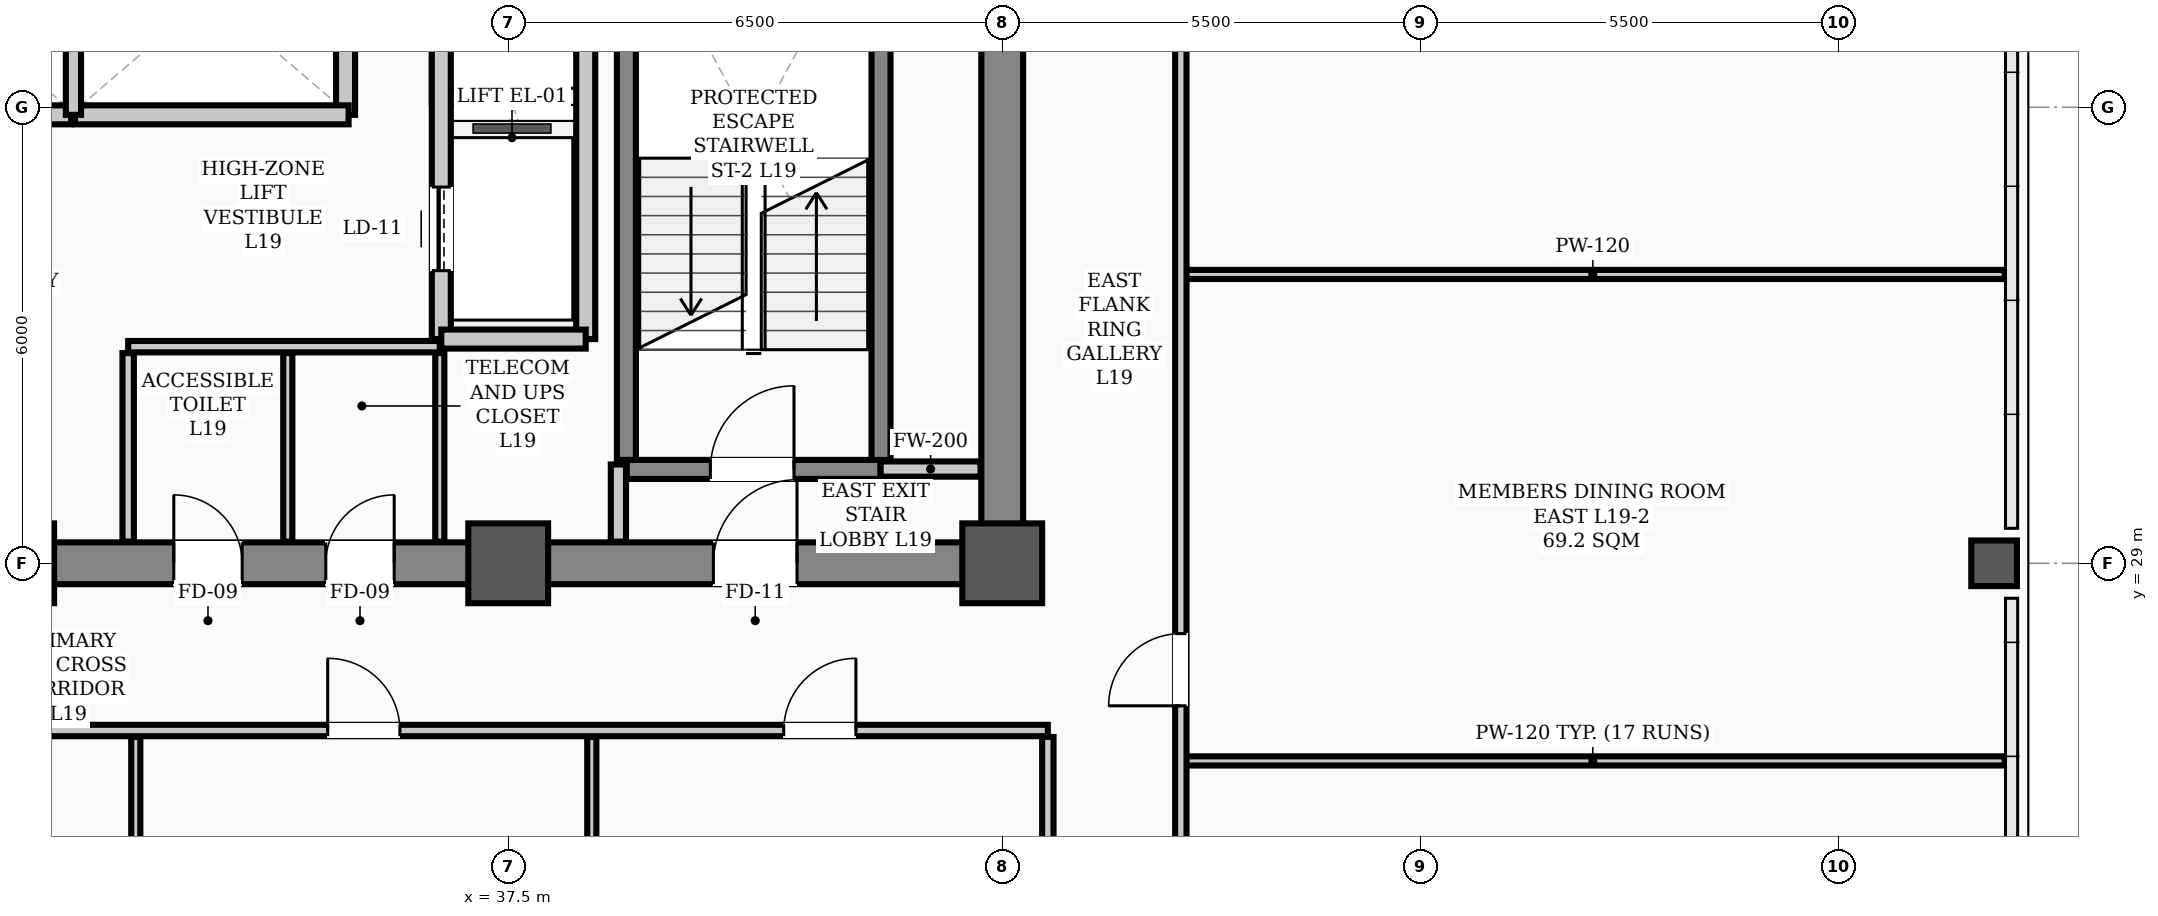
"""IFC4 building model, lengths in metres.
Left out: names, types, materials, properties, quantities, classifications, styles, units other than length and angle.
Written with IfcOpenShell. Run it as: python <this file> out.ifc"""

import sys

from ifc_helpers import new_model, si_unit, direction, frame, frame_2d, origin, origin_2d, place, context, subcontext, project, spatial, rectangle, hollow_rectangle, extrude, element, fill, save


model = new_model("IFC4")
c1 = context("Model", 3, precision=1e-05, world=origin(), true_north=direction((0.0, 1.0)))
c2 = subcontext(c1, "Body", "Model", "MODEL_VIEW")
j1 = project(units=[si_unit("LENGTHUNIT", "METRE"), si_unit("PLANEANGLEUNIT", "RADIAN")], contexts=[c1])
p1 = place(None, origin())
s1 = spatial("IfcSite", under=j1, at=p1, CompositionType="ELEMENT")
p2 = place(p1, origin())
s2 = spatial("IfcBuilding", under=s1, at=p2, CompositionType="ELEMENT")
p3 = place(p2, frame((0.0, 0.0, 77.2)))
s3 = spatial("IfcBuildingStorey", under=s2, at=p3, CompositionType="ELEMENT", Elevation=77.2)
for number, where, z_axis, x_axis in (
    (1, (31.0, 29.0, 0.0), (0.0, 0.0, 1.0), (1.0, 0.0, 0.0)),
    (2, (37.5, 29.0, 0.0), (0.0, 0.0, 1.0), (1.0, 0.0, 0.0)),
    (3, (44.0, 29.0, 0.0), (0.0, 0.0, 1.0), (1.0, 0.0, 0.0)),
):
    element("IfcColumn", number, at=place(p3, frame(where, z_axis=z_axis, x_axis=x_axis)), inside=s3, PredefinedType="COLUMN", context=c2, shape_type="SweptSolid", body=[
        extrude(hollow_rectangle(XDim=1.05, YDim=1.05, WallThickness=0.038, InnerFilletRadius=0.019, OuterFilletRadius=0.057, at=origin_2d()), origin(), (0.0, 0.0, 1.0), 3.9),
    ])
p4 = place(p3, frame((57.05, 29.0, 0.0), z_axis=(0.0, 0.0, 1.0), x_axis=(1.0, 0.0, 0.0)))
e4 = element("IfcColumn", 4, at=p4, inside=s3, PredefinedType="COLUMN", context=c2, shape_type="SweptSolid", body=[
    extrude(hollow_rectangle(XDim=0.6, YDim=0.6, WallThickness=0.026, InnerFilletRadius=0.013, OuterFilletRadius=0.039, at=origin_2d()), origin(), (0.0, 0.0, 1.0), 3.9),
])
p5 = place(p3, frame((13.5, 29.0, 0.0), z_axis=(0.0, 0.0, 1.0), x_axis=(1.0, 0.0, 0.0)))
e5 = element("IfcWall", 5, at=p5, inside=s3, PredefinedType="SHEAR", context=c2, shape_type="SweptSolid", body=[
    extrude(rectangle(XDim=30.5, YDim=0.55, at=frame_2d((15.25, 0.0))), origin(), (0.0, 0.0, 1.0), 3.66),
])
p6 = place(p5, frame((1.75, 0.0, 0.0)))
e6 = element("IfcOpeningElement", 6, at=p6, cuts=e5, PredefinedType="OPENING", context=c2, shape_type="SweptSolid", body=[
    extrude(rectangle(XDim=1.1, YDim=2.08, at=frame_2d((0.55, 1.04))), frame((0.0, 0.285, 0.0), z_axis=(0.0, -1.0, 0.0), x_axis=(1.0, 0.0, 0.0)), (0.0, 0.0, 1.0), 0.57),
])
p7 = place(p5, frame((26.7, 0.0, 0.0)))
e7 = element("IfcOpeningElement", 7, at=p7, cuts=e5, PredefinedType="OPENING", context=c2, shape_type="SweptSolid", body=[
    extrude(rectangle(XDim=1.1, YDim=2.08, at=frame_2d((0.55, 1.04))), frame((0.0, 0.285, 0.0), z_axis=(0.0, -1.0, 0.0), x_axis=(1.0, 0.0, 0.0)), (0.0, 0.0, 1.0), 0.57),
])
p8 = place(p5, frame((6.8, 0.0, 0.0)))
e8 = element("IfcOpeningElement", 8, at=p8, cuts=e5, PredefinedType="OPENING", context=c2, shape_type="SweptSolid", body=[
    extrude(rectangle(XDim=1.1, YDim=2.08, at=frame_2d((0.55, 1.04))), frame((0.0, 0.285, 0.0), z_axis=(0.0, -1.0, 0.0), x_axis=(1.0, 0.0, 0.0)), (0.0, 0.0, 1.0), 0.57),
])
p9 = place(p5, frame((13.2, 0.0, 0.0)))
e9 = element("IfcOpeningElement", 9, at=p9, cuts=e5, PredefinedType="OPENING", context=c2, shape_type="SweptSolid", body=[
    extrude(rectangle(XDim=1.6, YDim=2.08, at=frame_2d((0.8, 1.04))), frame((0.0, 0.285, 0.0), z_axis=(0.0, -1.0, 0.0), x_axis=(1.0, 0.0, 0.0)), (0.0, 0.0, 1.0), 0.57),
])
p10 = place(p5, frame((19.6, 0.0, 0.0)))
e10 = element("IfcOpeningElement", 10, at=p10, cuts=e5, PredefinedType="OPENING", context=c2, shape_type="SweptSolid", body=[
    extrude(rectangle(XDim=0.9, YDim=2.08, at=frame_2d((0.45, 1.04))), frame((0.0, 0.285, 0.0), z_axis=(0.0, -1.0, 0.0), x_axis=(1.0, 0.0, 0.0)), (0.0, 0.0, 1.0), 0.57),
])
p11 = place(p5, frame((21.6, 0.0, 0.0)))
e11 = element("IfcOpeningElement", 11, at=p11, cuts=e5, PredefinedType="OPENING", context=c2, shape_type="SweptSolid", body=[
    extrude(rectangle(XDim=0.9, YDim=2.08, at=frame_2d((0.45, 1.04))), frame((0.0, 0.285, 0.0), z_axis=(0.0, -1.0, 0.0), x_axis=(1.0, 0.0, 0.0)), (0.0, 0.0, 1.0), 0.57),
])
p12 = place(p3, frame((44.0, 29.35, 0.0), z_axis=(0.0, 0.0, 1.0), x_axis=(0.0, 1.0, 0.0)))
e12 = element("IfcWall", 12, at=p12, inside=s3, PredefinedType="SHEAR", context=c2, shape_type="SweptSolid", body=[
    extrude(rectangle(XDim=8.6, YDim=0.55, at=frame_2d((4.3, 0.0))), origin(), (0.0, 0.0, 1.0), 3.66),
])
p13 = place(p3, frame((39.06, 30.235, 0.0), z_axis=(0.0, 0.0, 1.0), x_axis=(1.0, 0.0, 0.0)))
e13 = element("IfcWall", 13, at=p13, inside=s3, PredefinedType="STANDARD", context=c2, shape_type="SweptSolid", body=[
    extrude(rectangle(XDim=3.34, YDim=0.25, at=frame_2d((1.67, 0.0))), origin(), (0.0, 0.0, 1.0), 3.66),
])
p14 = place(p13, frame((1.1, 0.0, 0.0)))
e14 = element("IfcOpeningElement", 14, at=p14, cuts=e13, PredefinedType="OPENING", context=c2, shape_type="SweptSolid", body=[
    extrude(rectangle(XDim=1.1, YDim=2.08, at=frame_2d((0.55, 1.04))), frame((0.0, 0.135, 0.0), z_axis=(0.0, -1.0, 0.0), x_axis=(1.0, 0.0, 0.0)), (0.0, 0.0, 1.0), 0.27),
])
for number, where, z_axis, x_axis in (
    (15, (39.055, 30.36, 0.0), (0.0, 0.0, 1.0), (0.0, 1.0, 0.0)),
    (16, (42.405, 30.36, 0.0), (0.0, 0.0, 1.0), (0.0, 1.0, 0.0)),
):
    element("IfcWall", number, at=place(p3, frame(where, z_axis=z_axis, x_axis=x_axis)), inside=s3, PredefinedType="STANDARD", context=c2, shape_type="SweptSolid", body=[
        extrude(rectangle(XDim=7.184, YDim=0.25, at=frame_2d((3.592, 0.0))), origin(), (0.0, 0.0, 1.0), 3.66),
    ])
p15 = place(p3, frame((36.62, 31.95, 0.0), z_axis=(0.0, 0.0, 1.0), x_axis=(0.0, 1.0, 0.0)))
e17 = element("IfcWall", 17, at=p15, inside=s3, PredefinedType="STANDARD", context=c2, shape_type="SweptSolid", body=[
    extrude(rectangle(XDim=6.0, YDim=0.25, at=frame_2d((3.0, 0.0))), origin(), (0.0, 0.0, 1.0), 2.24),
])
p16 = place(p15, frame((0.9, 0.0, 0.0)))
e18 = element("IfcOpeningElement", 18, at=p16, cuts=e17, PredefinedType="OPENING", context=c2, shape_type="SweptSolid", body=[
    extrude(rectangle(XDim=1.1, YDim=2.08, at=frame_2d((0.55, 1.04))), frame((0.0, 0.135, 0.0), z_axis=(0.0, -1.0, 0.0), x_axis=(1.0, 0.0, 0.0)), (0.0, 0.0, 1.0), 0.27),
])
p17 = place(p15, frame((4.0, 0.0, 0.0)))
e19 = element("IfcOpeningElement", 19, at=p17, cuts=e17, PredefinedType="OPENING", context=c2, shape_type="SweptSolid", body=[
    extrude(rectangle(XDim=1.1, YDim=2.08, at=frame_2d((0.55, 1.04))), frame((0.0, 0.135, 0.0), z_axis=(0.0, -1.0, 0.0), x_axis=(1.0, 0.0, 0.0)), (0.0, 0.0, 1.0), 0.27),
])
p18 = place(p3, frame((38.52, 31.95, 0.0), z_axis=(0.0, 0.0, 1.0), x_axis=(0.0, 1.0, 0.0)))
e20 = element("IfcWall", 20, at=p18, inside=s3, PredefinedType="STANDARD", context=c2, shape_type="SweptSolid", body=[
    extrude(rectangle(XDim=6.0, YDim=0.25, at=frame_2d((3.0, 0.0))), origin(), (0.0, 0.0, 1.0), 2.24),
])
p19 = place(p3, frame((36.62, 31.95, 0.0), z_axis=(0.0, 0.0, 1.0), x_axis=(1.0, 0.0, 0.0)))
e21 = element("IfcWall", 21, at=p19, inside=s3, PredefinedType="STANDARD", context=c2, shape_type="SweptSolid", body=[
    extrude(rectangle(XDim=1.9, YDim=0.25, at=frame_2d((0.95, 0.0))), origin(), (0.0, 0.0, 1.0), 3.48),
])
p20 = place(p3, frame((35.36, 34.9, 0.0), z_axis=(0.0, 0.0, 1.0), x_axis=(0.0, 1.0, 0.0)))
e22 = element("IfcWall", 22, at=p20, inside=s3, PredefinedType="STANDARD", context=c2, shape_type="SweptSolid", body=[
    extrude(rectangle(XDim=3.05, YDim=0.25, at=frame_2d((1.525, 0.0))), origin(), (0.0, 0.0, 1.0), 2.24),
])
p21 = place(p3, frame((28.2, 34.9, 0.0), z_axis=(0.0, 0.0, 1.0), x_axis=(1.0, 0.0, 0.0)))
e23 = element("IfcWall", 23, at=p21, inside=s3, PredefinedType="STANDARD", context=c2, shape_type="SweptSolid", body=[
    extrude(rectangle(XDim=3.55, YDim=0.25, at=frame_2d((1.775, 0.0))), origin(), (0.0, 0.0, 1.0), 3.66),
])
p22 = place(p3, frame((31.8, 34.9, 0.0), z_axis=(0.0, 0.0, 1.0), x_axis=(1.0, 0.0, 0.0)))
e24 = element("IfcWall", 24, at=p22, inside=s3, PredefinedType="STANDARD", context=c2, shape_type="SweptSolid", body=[
    extrude(rectangle(XDim=3.6, YDim=0.25, at=frame_2d((1.8, 0.0))), origin(), (0.0, 0.0, 1.0), 3.66),
])
p23 = place(p3, frame((42.4, 30.24, 0.0), z_axis=(0.0, 0.0, 1.0), x_axis=(1.0, 0.0, 0.0)))
e25 = element("IfcWall", 25, at=p23, inside=s3, PredefinedType="STANDARD", context=c2, shape_type="SweptSolid", body=[
    extrude(rectangle(XDim=1.315, YDim=0.2, at=frame_2d((0.658, 0.0))), origin(), (0.0, 0.0, 1.0), 2.24),
])
p24 = place(p3, frame((32.5, 31.85, 0.0), z_axis=(0.0, 0.0, 1.0), x_axis=(1.0, 0.0, 0.0)))
e26 = element("IfcWall", 26, at=p24, inside=s3, PredefinedType="PARTITIONING", context=c2, shape_type="SweptSolid", body=[
    extrude(rectangle(XDim=4.1, YDim=0.15, at=frame_2d((2.05, 0.0))), origin(), (0.0, 0.0, 1.0), 3.66),
])
p25 = place(p3, frame((12.9, 26.8, 0.0), z_axis=(0.0, 0.0, 1.0), x_axis=(1.0, 0.0, 0.0)))
e27 = element("IfcWall", 27, at=p25, inside=s3, PredefinedType="PARTITIONING", context=c2, shape_type="SweptSolid", body=[
    extrude(rectangle(XDim=31.7, YDim=0.15, at=frame_2d((15.85, 0.0))), origin(), (0.0, 0.0, 1.0), 2.24),
])
p26 = place(p25, frame((13.6, 0.0, 0.0)))
e28 = element("IfcOpeningElement", 28, at=p26, cuts=e27, PredefinedType="OPENING", context=c2, shape_type="SweptSolid", body=[
    extrude(rectangle(XDim=1.6, YDim=2.08, at=frame_2d((0.8, 1.04))), frame((0.0, 0.085, 0.0), z_axis=(0.0, -1.0, 0.0), x_axis=(1.0, 0.0, 0.0)), (0.0, 0.0, 1.0), 0.17),
])
p27 = place(p25, frame((1.875, 0.0, 0.0)))
e29 = element("IfcOpeningElement", 29, at=p27, cuts=e27, PredefinedType="OPENING", context=c2, shape_type="SweptSolid", body=[
    extrude(rectangle(XDim=0.95, YDim=2.08, at=frame_2d((0.475, 1.04))), frame((0.0, 0.085, 0.0), z_axis=(0.0, -1.0, 0.0), x_axis=(1.0, 0.0, 0.0)), (0.0, 0.0, 1.0), 0.17),
])
p28 = place(p25, frame((6.425, 0.0, 0.0)))
e30 = element("IfcOpeningElement", 30, at=p28, cuts=e27, PredefinedType="OPENING", context=c2, shape_type="SweptSolid", body=[
    extrude(rectangle(XDim=0.95, YDim=2.08, at=frame_2d((0.475, 1.04))), frame((0.0, 0.085, 0.0), z_axis=(0.0, -1.0, 0.0), x_axis=(1.0, 0.0, 0.0)), (0.0, 0.0, 1.0), 0.17),
])
p29 = place(p25, frame((10.725, 0.0, 0.0)))
e31 = element("IfcOpeningElement", 31, at=p29, cuts=e27, PredefinedType="OPENING", context=c2, shape_type="SweptSolid", body=[
    extrude(rectangle(XDim=0.95, YDim=2.08, at=frame_2d((0.475, 1.04))), frame((0.0, 0.085, 0.0), z_axis=(0.0, -1.0, 0.0), x_axis=(1.0, 0.0, 0.0)), (0.0, 0.0, 1.0), 0.17),
])
p30 = place(p25, frame((16.075, 0.0, 0.0)))
e32 = element("IfcOpeningElement", 32, at=p30, cuts=e27, PredefinedType="OPENING", context=c2, shape_type="SweptSolid", body=[
    extrude(rectangle(XDim=0.95, YDim=2.08, at=frame_2d((0.475, 1.04))), frame((0.0, 0.085, 0.0), z_axis=(0.0, -1.0, 0.0), x_axis=(1.0, 0.0, 0.0)), (0.0, 0.0, 1.0), 0.17),
])
p31 = place(p25, frame((22.225, 0.0, 0.0)))
e33 = element("IfcOpeningElement", 33, at=p31, cuts=e27, PredefinedType="OPENING", context=c2, shape_type="SweptSolid", body=[
    extrude(rectangle(XDim=0.95, YDim=2.08, at=frame_2d((0.475, 1.04))), frame((0.0, 0.085, 0.0), z_axis=(0.0, -1.0, 0.0), x_axis=(1.0, 0.0, 0.0)), (0.0, 0.0, 1.0), 0.17),
])
p32 = place(p25, frame((28.225, 0.0, 0.0)))
e34 = element("IfcOpeningElement", 34, at=p32, cuts=e27, PredefinedType="OPENING", context=c2, shape_type="SweptSolid", body=[
    extrude(rectangle(XDim=0.95, YDim=2.08, at=frame_2d((0.475, 1.04))), frame((0.0, 0.085, 0.0), z_axis=(0.0, -1.0, 0.0), x_axis=(1.0, 0.0, 0.0)), (0.0, 0.0, 1.0), 0.17),
])
for number, where, z_axis, x_axis in (
    (35, (46.35, 26.4, 0.0), (0.0, 0.0, 1.0), (1.0, 0.0, 0.0)),
    (36, (46.35, 32.8, 0.0), (0.0, 0.0, 1.0), (1.0, 0.0, 0.0)),
):
    element("IfcWall", number, at=place(p3, frame(where, z_axis=z_axis, x_axis=x_axis)), inside=s3, PredefinedType="PARTITIONING", context=c2, shape_type="SweptSolid", body=[
        extrude(rectangle(XDim=10.84, YDim=0.12, at=frame_2d((5.42, 0.0))), origin(), (0.0, 0.0, 1.0), 2.24),
    ])
p33 = place(p3, frame((38.95, 29.285, 0.0), z_axis=(0.0, 0.0, 1.0), x_axis=(0.0, 1.0, 0.0)))
e37 = element("IfcWall", 37, at=p33, inside=s3, PredefinedType="STANDARD", context=c2, shape_type="SweptSolid", body=[
    extrude(rectangle(XDim=1.015, YDim=0.2, at=frame_2d((0.508, 0.0))), origin(), (0.0, 0.0, 1.0), 2.24),
])
p34 = place(p3, frame((32.5, 29.285, 0.0), z_axis=(0.0, 0.0, 1.0), x_axis=(0.0, 1.0, 0.0)))
e38 = element("IfcWall", 38, at=p34, inside=s3, PredefinedType="PARTITIONING", context=c2, shape_type="SweptSolid", body=[
    extrude(rectangle(XDim=2.48, YDim=0.15, at=frame_2d((1.24, 0.0))), origin(), (0.0, 0.0, 1.0), 2.24),
])
for number, where, z_axis, x_axis in (
    (39, (36.6, 29.285, 0.0), (0.0, 0.0, 1.0), (0.0, 1.0, 0.0)),
    (40, (34.6, 29.285, 0.0), (0.0, 0.0, 1.0), (0.0, 1.0, 0.0)),
):
    element("IfcWall", number, at=place(p3, frame(where, z_axis=z_axis, x_axis=x_axis)), inside=s3, PredefinedType="PARTITIONING", context=c2, shape_type="SweptSolid", body=[
        extrude(rectangle(XDim=2.48, YDim=0.12, at=frame_2d((1.24, 0.0))), origin(), (0.0, 0.0, 1.0), 2.24),
    ])
p35 = place(p3, frame((46.35, 17.635, 0.0), z_axis=(0.0, 0.0, 1.0), x_axis=(0.0, 1.0, 0.0)))
e41 = element("IfcWall", 41, at=p35, inside=s3, PredefinedType="PARTITIONING", context=c2, shape_type="SweptSolid", body=[
    extrude(rectangle(XDim=22.53, YDim=0.15, at=frame_2d((11.265, 0.0))), origin(), (0.0, 0.0, 1.0), 2.24),
])
p36 = place(p35, frame((3.865, 0.0, 0.0)))
e42 = element("IfcOpeningElement", 42, at=p36, cuts=e41, PredefinedType="OPENING", context=c2, shape_type="SweptSolid", body=[
    extrude(rectangle(XDim=0.95, YDim=2.08, at=frame_2d((0.475, 1.04))), frame((0.0, 0.085, 0.0), z_axis=(0.0, -1.0, 0.0), x_axis=(1.0, 0.0, 0.0)), (0.0, 0.0, 1.0), 0.17),
])
p37 = place(p35, frame((9.49, 0.0, 0.0)))
e43 = element("IfcOpeningElement", 43, at=p37, cuts=e41, PredefinedType="OPENING", context=c2, shape_type="SweptSolid", body=[
    extrude(rectangle(XDim=0.95, YDim=2.08, at=frame_2d((0.475, 1.04))), frame((0.0, 0.085, 0.0), z_axis=(0.0, -1.0, 0.0), x_axis=(1.0, 0.0, 0.0)), (0.0, 0.0, 1.0), 0.17),
])
p38 = place(p35, frame((18.415, 0.0, 0.0)))
e44 = element("IfcOpeningElement", 44, at=p38, cuts=e41, PredefinedType="OPENING", context=c2, shape_type="SweptSolid", body=[
    extrude(rectangle(XDim=0.95, YDim=2.08, at=frame_2d((0.475, 1.04))), frame((0.0, 0.085, 0.0), z_axis=(0.0, -1.0, 0.0), x_axis=(1.0, 0.0, 0.0)), (0.0, 0.0, 1.0), 0.17),
])
p39 = place(p3, frame((44.6, 19.335, 0.0), z_axis=(0.0, 0.0, 1.0), x_axis=(0.0, 1.0, 0.0)))
e45 = element("IfcWall", 45, at=p39, inside=s3, PredefinedType="PARTITIONING", context=c2, shape_type="SweptSolid", body=[
    extrude(rectangle(XDim=7.38, YDim=0.15, at=frame_2d((3.69, 0.0))), origin(), (0.0, 0.0, 1.0), 2.24),
])
for number, where, z_axis, x_axis in (
    (46, (32.6, 19.335, 0.0), (0.0, 0.0, 1.0), (0.0, 1.0, 0.0)),
    (47, (38.6, 19.335, 0.0), (0.0, 0.0, 1.0), (0.0, 1.0, 0.0)),
):
    element("IfcWall", number, at=place(p3, frame(where, z_axis=z_axis, x_axis=x_axis)), inside=s3, PredefinedType="PARTITIONING", context=c2, shape_type="SweptSolid", body=[
        extrude(rectangle(XDim=7.38, YDim=0.12, at=frame_2d((3.69, 0.0))), origin(), (0.0, 0.0, 1.0), 2.24),
    ])
p40 = place(p3, frame((31.78, 34.9, 0.0), z_axis=(0.0, 0.0, 1.0), x_axis=(0.0, 1.0, 0.0)))
e48 = element("IfcWall", 48, at=p40, inside=s3, PredefinedType="STANDARD", context=c2, shape_type="SweptSolid", body=[
    extrude(rectangle(XDim=3.12, YDim=0.2, at=frame_2d((1.56, 0.0))), origin(), (0.0, 0.0, 1.0), 2.24),
])
p41 = place(p14, origin())
e49 = element("IfcDoor", 49, at=p41, inside=s3, OperationType="SINGLE_SWING_RIGHT", PredefinedType="DOOR", context=c2, shape_type="SweptSolid", body=[
    extrude(rectangle(XDim=1.1, YDim=2.08, at=frame_2d((0.55, 1.04))), frame((0.0, 0.025, 0.0), z_axis=(0.0, -1.0, 0.0), x_axis=(1.0, 0.0, 0.0)), (0.0, 0.0, 1.0), 0.05),
])
fill(e14, e49)
p42 = place(p7, origin())
e50 = element("IfcDoor", 50, at=p42, inside=s3, OperationType="SINGLE_SWING_RIGHT", PredefinedType="DOOR", context=c2, shape_type="SweptSolid", body=[
    extrude(rectangle(XDim=1.1, YDim=2.08, at=frame_2d((0.55, 1.04))), frame((0.0, 0.025, 0.0), z_axis=(0.0, -1.0, 0.0), x_axis=(1.0, 0.0, 0.0)), (0.0, 0.0, 1.0), 0.05),
])
fill(e7, e50)
p43 = place(p10, origin())
e51 = element("IfcDoor", 51, at=p43, inside=s3, OperationType="SINGLE_SWING_LEFT", PredefinedType="DOOR", context=c2, shape_type="SweptSolid", body=[
    extrude(rectangle(XDim=0.9, YDim=2.08, at=frame_2d((0.45, 1.04))), frame((0.0, 0.025, 0.0), z_axis=(0.0, -1.0, 0.0), x_axis=(1.0, 0.0, 0.0)), (0.0, 0.0, 1.0), 0.05),
])
fill(e10, e51)
p44 = place(p11, origin())
e52 = element("IfcDoor", 52, at=p44, inside=s3, OperationType="SINGLE_SWING_RIGHT", PredefinedType="DOOR", context=c2, shape_type="SweptSolid", body=[
    extrude(rectangle(XDim=0.9, YDim=2.08, at=frame_2d((0.45, 1.04))), frame((0.0, 0.025, 0.0), z_axis=(0.0, -1.0, 0.0), x_axis=(1.0, 0.0, 0.0)), (0.0, 0.0, 1.0), 0.05),
])
fill(e11, e52)
p45 = place(p31, origin())
e53 = element("IfcDoor", 53, at=p45, inside=s3, OperationType="SINGLE_SWING_LEFT", PredefinedType="DOOR", context=c2, shape_type="SweptSolid", body=[
    extrude(rectangle(XDim=0.95, YDim=2.08, at=frame_2d((0.475, 1.04))), frame((0.0, 0.025, 0.0), z_axis=(0.0, -1.0, 0.0), x_axis=(1.0, 0.0, 0.0)), (0.0, 0.0, 1.0), 0.05),
])
fill(e33, e53)
p46 = place(p32, origin())
e54 = element("IfcDoor", 54, at=p46, inside=s3, OperationType="SINGLE_SWING_RIGHT", PredefinedType="DOOR", context=c2, shape_type="SweptSolid", body=[
    extrude(rectangle(XDim=0.95, YDim=2.08, at=frame_2d((0.475, 1.04))), frame((0.0, 0.025, 0.0), z_axis=(0.0, -1.0, 0.0), x_axis=(1.0, 0.0, 0.0)), (0.0, 0.0, 1.0), 0.05),
])
fill(e34, e54)
p47 = place(p37, origin())
e55 = element("IfcDoor", 55, at=p47, inside=s3, OperationType="SINGLE_SWING_LEFT", PredefinedType="DOOR", context=c2, shape_type="SweptSolid", body=[
    extrude(rectangle(XDim=0.95, YDim=2.08, at=frame_2d((0.475, 1.04))), frame((0.0, 0.025, 0.0), z_axis=(0.0, -1.0, 0.0), x_axis=(1.0, 0.0, 0.0)), (0.0, 0.0, 1.0), 0.05),
])
fill(e43, e55)
p48 = place(p16, origin())
e56 = element("IfcDoor", 56, at=p48, inside=s3, OperationType="SLIDING_TO_LEFT", PredefinedType="DOOR", context=c2, shape_type="SweptSolid", body=[
    extrude(rectangle(XDim=1.1, YDim=2.08, at=frame_2d((0.55, 1.04))), frame((0.0, 0.025, 0.0), z_axis=(0.0, -1.0, 0.0), x_axis=(1.0, 0.0, 0.0)), (0.0, 0.0, 1.0), 0.05),
])
fill(e18, e56)
save(model, sys.argv[1])
